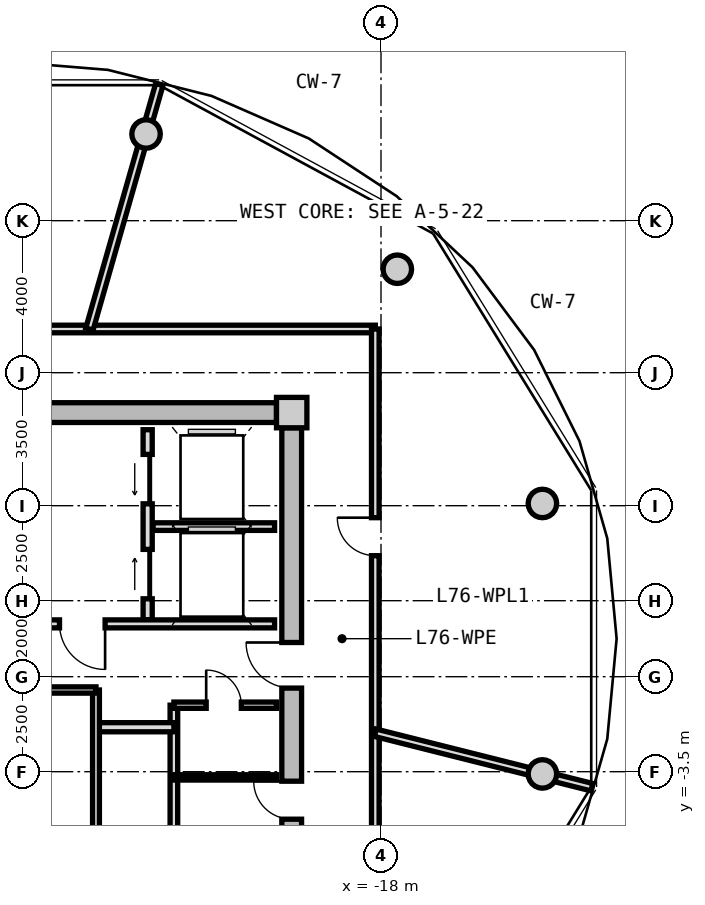
"""IFC4 building model, lengths in metres.
Left out: names, types, materials, properties, quantities, classifications, styles, units other than length and angle.
Written with IfcOpenShell. Run it as: python <this file> out.ifc"""

import sys

from ifc_helpers import new_model, si_unit, direction, frame, frame_2d, origin, origin_2d, place, context, subcontext, project, spatial, rectangle, circle, extrude, source, transform, mapped, element, fill, save


model = new_model("IFC4")
c1 = context("Model", 3, precision=1e-05, world=origin(), true_north=direction((0.0, 1.0)))
c2 = subcontext(c1, "Body", "Model", "MODEL_VIEW")
j1 = project(units=[si_unit("LENGTHUNIT", "METRE"), si_unit("PLANEANGLEUNIT", "RADIAN")], contexts=[c1])
p1 = place(None, origin())
s1 = spatial("IfcSite", under=j1, at=p1, CompositionType="ELEMENT")
p2 = place(p1, origin())
s2 = spatial("IfcBuilding", under=s1, at=p2, CompositionType="ELEMENT")
p3 = place(p2, frame((0.0, 0.0, 244.4)))
s3 = spatial("IfcBuildingStorey", under=s2, at=p3, CompositionType="ELEMENT", Elevation=244.4)
m1 = source(origin(), c2, "Body", "SweptSolid", [
    extrude(rectangle(XDim=0.8, YDim=0.8, at=origin_2d()), origin(), (0.0, 0.0, 1.0), 5.45),
])
p4 = place(p3, frame((-20.35, 5.95, 0.0), z_axis=(0.0, 0.0, 1.0), x_axis=(1.0, 0.0, 0.0)))
e1 = element("IfcColumn", 1, at=p4, inside=s3, PredefinedType="COLUMN", context=c2, shape_type="MappedRepresentation", body=[
    mapped(m1, transform((0.0, 0.0, 0.0), x_axis=(1.0, 0.0, 0.0), y_axis=(0.0, 1.0, 0.0), z_axis=(0.0, 0.0, 1.0), scale=1.0)),
])
m2 = source(origin(), c2, "Body", "SweptSolid", [
    extrude(rectangle(XDim=14.5, YDim=0.52, at=frame_2d((7.25, 0.0))), origin(), (0.0, 0.0, 1.0), 5.175),
])
p5 = place(p3, frame((-35.25, 5.95, 0.0), z_axis=(0.0, 0.0, 1.0), x_axis=(1.0, 0.0, 0.0)))
e2 = element("IfcWall", 2, at=p5, inside=s3, PredefinedType="SHEAR", context=c2, shape_type="MappedRepresentation", body=[
    mapped(m2, transform((0.0, 0.0, 0.0), x_axis=(1.0, 0.0, 0.0), y_axis=(0.0, 1.0, 0.0), z_axis=(0.0, 0.0, 1.0), scale=1.0)),
])
m3 = source(origin(), c2, "Body", "SweptSolid", [
    extrude(rectangle(XDim=11.1, YDim=0.52, at=frame_2d((5.55, 0.0))), origin(), (0.0, 0.0, 1.0), 5.175),
])
p6 = place(p3, frame((-20.35, 5.55, 0.0), z_axis=(0.0, 0.0, 1.0), x_axis=(0.0, -1.0, 0.0)))
e3 = element("IfcWall", 3, at=p6, inside=s3, PredefinedType="SHEAR", context=c2, shape_type="MappedRepresentation", body=[
    mapped(m3, transform((0.0, 0.0, 0.0), x_axis=(1.0, 0.0, 0.0), y_axis=(0.0, 1.0, 0.0), z_axis=(0.0, 0.0, 1.0), scale=1.0)),
])
p7 = place(p6, frame((5.65, 0.0, 0.0)))
e4 = element("IfcOpeningElement", 4, at=p7, cuts=e3, PredefinedType="OPENING", context=c2, shape_type="SweptSolid", body=[
    extrude(rectangle(XDim=1.2, YDim=2.15, at=frame_2d((0.6, 1.075))), frame((0.0, 0.27, 0.0), z_axis=(0.0, -1.0, 0.0), x_axis=(1.0, 0.0, 0.0)), (0.0, 0.0, 1.0), 0.54),
])
p8 = place(p6, frame((9.3, 0.0, 0.0)))
e5 = element("IfcOpeningElement", 5, at=p8, cuts=e3, PredefinedType="OPENING", context=c2, shape_type="SweptSolid", body=[
    extrude(rectangle(XDim=1.0, YDim=2.1, at=frame_2d((0.5, 1.05))), frame((0.0, 0.27, 0.0), z_axis=(0.0, -1.0, 0.0), x_axis=(1.0, 0.0, 0.0)), (0.0, 0.0, 1.0), 0.54),
])
m4 = source(origin(), c2, "Body", "SweptSolid", [
    extrude(circle(Radius=0.375, at=origin_2d()), origin(), (0.0, 0.0, 1.0), 5.45),
])
for number, where, z_axis, x_axis in (
    (6, (-13.753, 3.559, 0.0), (0.0, 0.0, 1.0), (1.0, 0.0, 0.0)),
    (7, (-17.57, 9.723, 0.0), (0.0, 0.0, 1.0), (1.0, 0.0, 0.0)),
    (8, (-24.182, 13.281, 0.0), (0.0, 0.0, 1.0), (1.0, 0.0, 0.0)),
    (9, (-13.753, -3.559, 0.0), (0.0, 0.0, 1.0), (1.0, 0.0, 0.0)),
):
    element("IfcColumn", number, at=place(p3, frame(where, z_axis=z_axis, x_axis=x_axis)), inside=s3, PredefinedType="COLUMN", context=c2, shape_type="MappedRepresentation", body=[
        mapped(m4, transform((0.0, 0.0, 0.0), x_axis=(1.0, 0.0, 0.0), y_axis=(0.0, 1.0, 0.0), z_axis=(0.0, 0.0, 1.0), scale=1.0)),
    ])
m5 = source(origin(), c2, "Body", "SweptSolid", [
    extrude(rectangle(XDim=5.0, YDim=0.24, at=frame_2d((2.5, 0.0))), origin(), (0.0, 0.0, 1.0), 5.16),
])
p9 = place(p3, frame((-24.14, 0.5, 0.0), z_axis=(0.0, 0.0, 1.0), x_axis=(0.0, 1.0, 0.0)))
e10 = element("IfcWall", 10, at=p9, inside=s3, PredefinedType="PARTITIONING", context=c2, shape_type="MappedRepresentation", body=[
    mapped(m5, transform((0.0, 0.0, 0.0), x_axis=(1.0, 0.0, 0.0), y_axis=(0.0, 1.0, 0.0), z_axis=(0.0, 0.0, 1.0), scale=1.0)),
])
p10 = place(p9, frame((3.05, 0.0, 0.0)))
e11 = element("IfcOpeningElement", 11, at=p10, cuts=e10, PredefinedType="OPENING", context=c2, shape_type="SweptSolid", body=[
    extrude(rectangle(XDim=1.3, YDim=2.2, at=frame_2d((0.65, 1.1))), frame((0.0, 0.13, 0.0), z_axis=(0.0, -1.0, 0.0), x_axis=(1.0, 0.0, 0.0)), (0.0, 0.0, 1.0), 0.26),
])
p11 = place(p9, frame((0.55, 0.0, 0.0)))
e12 = element("IfcOpeningElement", 12, at=p11, cuts=e10, PredefinedType="OPENING", context=c2, shape_type="SweptSolid", body=[
    extrude(rectangle(XDim=1.3, YDim=2.2, at=frame_2d((0.65, 1.1))), frame((0.0, 0.13, 0.0), z_axis=(0.0, -1.0, 0.0), x_axis=(1.0, 0.0, 0.0)), (0.0, 0.0, 1.0), 0.26),
])
m6 = source(origin(), c2, "Body", "SweptSolid", [
    extrude(rectangle(XDim=3.2, YDim=0.2, at=frame_2d((1.6, 0.0))), origin(), (0.0, 0.0, 1.0), 5.16),
])
p12 = place(p3, frame((-24.0, 2.95, 0.0), z_axis=(0.0, 0.0, 1.0), x_axis=(1.0, 0.0, 0.0)))
e13 = element("IfcWall", 13, at=p12, inside=s3, PredefinedType="PARTITIONING", context=c2, shape_type="MappedRepresentation", body=[
    mapped(m6, transform((0.0, 0.0, 0.0), x_axis=(1.0, 0.0, 0.0), y_axis=(0.0, 1.0, 0.0), z_axis=(0.0, 0.0, 1.0), scale=1.0)),
])
m7 = source(origin(), c2, "Body", "SweptSolid", [
    extrude(rectangle(XDim=6.66, YDim=0.21, at=frame_2d((3.33, 0.0))), origin(), (0.0, 0.0, 1.0), 5.16),
])
p13 = place(p3, frame((-27.46, 0.39, 0.0), z_axis=(0.0, 0.0, 1.0), x_axis=(1.0, 0.0, 0.0)))
e14 = element("IfcWall", 14, at=p13, inside=s3, PredefinedType="PARTITIONING", context=c2, shape_type="MappedRepresentation", body=[
    mapped(m7, transform((0.0, 0.0, 0.0), x_axis=(1.0, 0.0, 0.0), y_axis=(0.0, 1.0, 0.0), z_axis=(0.0, 0.0, 1.0), scale=1.0)),
])
p14 = place(p13, frame((1.0, 0.0, 0.0)))
e15 = element("IfcOpeningElement", 15, at=p14, cuts=e14, PredefinedType="OPENING", context=c2, shape_type="SweptSolid", body=[
    extrude(rectangle(XDim=1.2, YDim=2.15, at=frame_2d((0.6, 1.075))), frame((0.0, 0.115, 0.0), z_axis=(0.0, -1.0, 0.0), x_axis=(1.0, 0.0, 0.0)), (0.0, 0.0, 1.0), 0.23),
])
m8 = source(origin(), c2, "Body", "SweptSolid", [
    extrude(rectangle(XDim=3.8, YDim=0.2, at=frame_2d((1.9, 0.0))), origin(), (0.0, 0.0, 1.0), 5.16),
])
p15 = place(p3, frame((-23.45, -5.55, 0.0), z_axis=(0.0, 0.0, 1.0), x_axis=(0.0, 1.0, 0.0)))
e16 = element("IfcWall", 16, at=p15, inside=s3, PredefinedType="PARTITIONING", context=c2, shape_type="MappedRepresentation", body=[
    mapped(m8, transform((0.0, 0.0, 0.0), x_axis=(1.0, 0.0, 0.0), y_axis=(0.0, 1.0, 0.0), z_axis=(0.0, 0.0, 1.0), scale=1.0)),
])
m9 = source(origin(), c2, "Body", "SweptSolid", [
    extrude(rectangle(XDim=2.05, YDim=0.24, at=frame_2d((1.025, 0.0))), origin(), (0.0, 0.0, 1.0), 5.16),
])
p16 = place(p3, frame((-25.5, -2.33, 0.0), z_axis=(0.0, 0.0, 1.0), x_axis=(1.0, 0.0, 0.0)))
e17 = element("IfcWall", 17, at=p16, inside=s3, PredefinedType="PARTITIONING", context=c2, shape_type="MappedRepresentation", body=[
    mapped(m9, transform((0.0, 0.0, 0.0), x_axis=(1.0, 0.0, 0.0), y_axis=(0.0, 1.0, 0.0), z_axis=(0.0, 0.0, 1.0), scale=1.0)),
])
m10 = source(origin(), c2, "Body", "SweptSolid", [
    extrude(rectangle(XDim=4.2, YDim=0.18, at=frame_2d((2.1, 0.0))), origin(), (0.0, 0.0, 1.0), 5.16),
])
p17 = place(p3, frame((-25.5, -5.55, 0.0), z_axis=(0.0, 0.0, 1.0), x_axis=(0.0, 1.0, 0.0)))
e18 = element("IfcWall", 18, at=p17, inside=s3, PredefinedType="PARTITIONING", context=c2, shape_type="MappedRepresentation", body=[
    mapped(m10, transform((0.0, 0.0, 0.0), x_axis=(1.0, 0.0, 0.0), y_axis=(0.0, 1.0, 0.0), z_axis=(0.0, 0.0, 1.0), scale=1.0)),
])
m11 = source(origin(), c2, "Body", "SweptSolid", [
    extrude(rectangle(XDim=4.77, YDim=0.165, at=frame_2d((2.385, 0.0))), origin(), (0.0, 0.0, 1.0), 5.16),
])
p18 = place(p3, frame((-30.27, -1.35, 0.0), z_axis=(0.0, 0.0, 1.0), x_axis=(1.0, 0.0, 0.0)))
e19 = element("IfcWall", 19, at=p18, inside=s3, PredefinedType="PARTITIONING", context=c2, shape_type="MappedRepresentation", body=[
    mapped(m11, transform((0.0, 0.0, 0.0), x_axis=(1.0, 0.0, 0.0), y_axis=(0.0, 1.0, 0.0), z_axis=(0.0, 0.0, 1.0), scale=1.0)),
])
p19 = place(p18, frame((1.85, 0.0, 0.0)))
e20 = element("IfcOpeningElement", 20, at=p19, cuts=e19, PredefinedType="OPENING", context=c2, shape_type="SweptSolid", body=[
    extrude(rectangle(XDim=1.0, YDim=2.1, at=frame_2d((0.5, 1.05))), frame((0.0, 0.093, 0.0), z_axis=(0.0, -1.0, 0.0), x_axis=(1.0, 0.0, 0.0)), (0.0, 0.0, 1.0), 0.185),
])
m12 = source(origin(), c2, "Body", "SweptSolid", [
    extrude(rectangle(XDim=2.7, YDim=0.165, at=frame_2d((1.35, 0.0))), origin(), (0.0, 0.0, 1.0), 5.16),
])
p20 = place(p3, frame((-23.45, -1.75, 0.0), z_axis=(0.0, 0.0, 1.0), x_axis=(1.0, 0.0, 0.0)))
e21 = element("IfcWall", 21, at=p20, inside=s3, PredefinedType="PARTITIONING", context=c2, shape_type="MappedRepresentation", body=[
    mapped(m12, transform((0.0, 0.0, 0.0), x_axis=(1.0, 0.0, 0.0), y_axis=(0.0, 1.0, 0.0), z_axis=(0.0, 0.0, 1.0), scale=1.0)),
])
p21 = place(p20, frame((0.85, 0.0, 0.0)))
e22 = element("IfcOpeningElement", 22, at=p21, cuts=e21, PredefinedType="OPENING", context=c2, shape_type="SweptSolid", body=[
    extrude(rectangle(XDim=0.925, YDim=2.1, at=frame_2d((0.462, 1.05))), frame((0.0, 0.093, 0.0), z_axis=(0.0, -1.0, 0.0), x_axis=(1.0, 0.0, 0.0)), (0.0, 0.0, 1.0), 0.185),
])
m13 = source(origin(), c2, "Body", "SweptSolid", [
    extrude(rectangle(XDim=2.7, YDim=0.14, at=frame_2d((1.35, 0.0))), origin(), (0.0, 0.0, 1.0), 5.16),
])
p22 = place(p3, frame((-23.45, -3.65, 0.0), z_axis=(0.0, 0.0, 1.0), x_axis=(1.0, 0.0, 0.0)))
e23 = element("IfcWall", 23, at=p22, inside=s3, PredefinedType="PARTITIONING", context=c2, shape_type="MappedRepresentation", body=[
    mapped(m13, transform((0.0, 0.0, 0.0), x_axis=(1.0, 0.0, 0.0), y_axis=(0.0, 1.0, 0.0), z_axis=(0.0, 0.0, 1.0), scale=1.0)),
])
m14 = source(origin(), c2, "Body", "SweptSolid", [
    extrude(rectangle(XDim=19.7, YDim=0.2, at=frame_2d((9.85, 0.0))), origin(), (0.0, 0.0, 1.0), 5.16),
])
p23 = place(p3, frame((-37.85, 8.15, 0.0), z_axis=(0.0, 0.0, 1.0), x_axis=(1.0, 0.0, 0.0)))
e24 = element("IfcWall", 24, at=p23, inside=s3, PredefinedType="PARTITIONING", context=c2, shape_type="MappedRepresentation", body=[
    mapped(m14, transform((0.0, 0.0, 0.0), x_axis=(1.0, 0.0, 0.0), y_axis=(0.0, 1.0, 0.0), z_axis=(0.0, 0.0, 1.0), scale=1.0)),
])
p24 = place(p23, frame((5.725, 0.0, 0.0)))
e25 = element("IfcOpeningElement", 25, at=p24, cuts=e24, PredefinedType="OPENING", context=c2, shape_type="SweptSolid", body=[
    extrude(rectangle(XDim=1.0, YDim=2.1, at=frame_2d((0.5, 1.05))), frame((0.0, 0.11, 0.0), z_axis=(0.0, -1.0, 0.0), x_axis=(1.0, 0.0, 0.0)), (0.0, 0.0, 1.0), 0.22),
])
m15 = source(origin(), c2, "Body", "SweptSolid", [
    extrude(rectangle(XDim=16.3, YDim=0.2, at=frame_2d((8.15, 0.0))), origin(), (0.0, 0.0, 1.0), 5.16),
])
p25 = place(p3, frame((-18.15, 8.15, 0.0), z_axis=(0.0, 0.0, 1.0), x_axis=(0.0, -1.0, 0.0)))
e26 = element("IfcWall", 26, at=p25, inside=s3, PredefinedType="PARTITIONING", context=c2, shape_type="MappedRepresentation", body=[
    mapped(m15, transform((0.0, 0.0, 0.0), x_axis=(1.0, 0.0, 0.0), y_axis=(0.0, 1.0, 0.0), z_axis=(0.0, 0.0, 1.0), scale=1.0)),
])
p26 = place(p25, frame((4.966, 0.0, 0.0)))
e27 = element("IfcOpeningElement", 27, at=p26, cuts=e26, PredefinedType="OPENING", context=c2, shape_type="SweptSolid", body=[
    extrude(rectangle(XDim=1.0, YDim=2.1, at=frame_2d((0.5, 1.05))), frame((0.0, 0.11, 0.0), z_axis=(0.0, -1.0, 0.0), x_axis=(1.0, 0.0, 0.0)), (0.0, 0.0, 1.0), 0.22),
])
m16 = source(origin(), c2, "Body", "SweptSolid", [
    extrude(rectangle(XDim=5.879, YDim=0.2, at=frame_2d((2.939, 0.0))), origin(), (0.0, 0.0, 1.0), 4.76),
])
p27 = place(p3, frame((-18.15, -2.475, 0.0), z_axis=(0.0, 0.0, 1.0), x_axis=(0.96984127658, -0.24373735504, 0.0)))
e28 = element("IfcWall", 28, at=p27, inside=s3, PredefinedType="PARTITIONING", context=c2, shape_type="MappedRepresentation", body=[
    mapped(m16, transform((0.0, 0.0, 0.0), x_axis=(1.0, 0.0, 0.0), y_axis=(0.0, 1.0, 0.0), z_axis=(0.0, 0.0, 1.0), scale=1.0)),
])
m17 = source(origin(), c2, "Body", "SweptSolid", [
    extrude(rectangle(XDim=6.693, YDim=0.2, at=frame_2d((3.347, 0.0))), origin(), (0.0, 0.0, 1.0), 4.76),
])
p28 = place(p3, frame((-25.672, 8.15, 0.0), z_axis=(0.0, 0.0, 1.0), x_axis=(0.2747066748, 0.96152807698, 0.0)))
e29 = element("IfcWall", 29, at=p28, inside=s3, PredefinedType="PARTITIONING", context=c2, shape_type="MappedRepresentation", body=[
    mapped(m17, transform((0.0, 0.0, 0.0), x_axis=(1.0, 0.0, 0.0), y_axis=(0.0, 1.0, 0.0), z_axis=(0.0, 0.0, 1.0), scale=1.0)),
])
m18 = source(origin(), c2, "Body", "SweptSolid", [
    extrude(rectangle(XDim=1.3, YDim=2.2, at=frame_2d((0.65, 1.1))), frame((0.0, 0.025, 0.0), z_axis=(0.0, -1.0, 0.0), x_axis=(1.0, 0.0, 0.0)), (0.0, 0.0, 1.0), 0.05),
])
p29 = place(p10, origin())
e30 = element("IfcDoor", 30, at=p29, inside=s3, OperationType="SLIDING_TO_LEFT", PredefinedType="DOOR", context=c2, shape_type="MappedRepresentation", body=[
    mapped(m18, transform((0.0, 0.0, 0.0), x_axis=(1.0, 0.0, 0.0), y_axis=(0.0, 1.0, 0.0), z_axis=(0.0, 0.0, 1.0), scale=1.0)),
])
fill(e11, e30)
p30 = place(p11, origin())
e31 = element("IfcDoor", 31, at=p30, inside=s3, OperationType="SLIDING_TO_RIGHT", PredefinedType="DOOR", context=c2, shape_type="MappedRepresentation", body=[
    mapped(m18, transform((0.0, 0.0, 0.0), x_axis=(1.0, 0.0, 0.0), y_axis=(0.0, 1.0, 0.0), z_axis=(0.0, 0.0, 1.0), scale=1.0)),
])
fill(e12, e31)
m19 = source(origin(), c2, "Body", "SweptSolid", [
    extrude(rectangle(XDim=1.2, YDim=2.15, at=frame_2d((0.6, 1.075))), frame((0.0, 0.025, 0.0), z_axis=(0.0, -1.0, 0.0), x_axis=(1.0, 0.0, 0.0)), (0.0, 0.0, 1.0), 0.05),
])
p31 = place(p14, frame((1.2, 0.0, 0.0), z_axis=(0.0, 0.0, 1.0), x_axis=(-1.0, 0.0, 0.0)))
e32 = element("IfcDoor", 32, at=p31, inside=s3, OperationType="SINGLE_SWING_LEFT", PredefinedType="DOOR", context=c2, shape_type="MappedRepresentation", body=[
    mapped(m19, transform((0.0, 0.0, 0.0), x_axis=(1.0, 0.0, 0.0), y_axis=(0.0, 1.0, 0.0), z_axis=(0.0, 0.0, 1.0), scale=1.0)),
])
fill(e15, e32)
p32 = place(p7, frame((1.2, 0.0, 0.0), z_axis=(0.0, 0.0, 1.0), x_axis=(-1.0, 0.0, 0.0)))
e33 = element("IfcDoor", 33, at=p32, inside=s3, OperationType="SINGLE_SWING_RIGHT", PredefinedType="DOOR", context=c2, shape_type="MappedRepresentation", body=[
    mapped(m19, transform((0.0, 0.0, 0.0), x_axis=(1.0, 0.0, 0.0), y_axis=(0.0, 1.0, 0.0), z_axis=(0.0, 0.0, 1.0), scale=1.0)),
])
fill(e4, e33)
m20 = source(origin(), c2, "Body", "SweptSolid", [
    extrude(rectangle(XDim=0.925, YDim=2.1, at=frame_2d((0.462, 1.05))), frame((0.0, 0.025, 0.0), z_axis=(0.0, -1.0, 0.0), x_axis=(1.0, 0.0, 0.0)), (0.0, 0.0, 1.0), 0.05),
])
p33 = place(p21, origin())
e34 = element("IfcDoor", 34, at=p33, inside=s3, OperationType="SINGLE_SWING_LEFT", PredefinedType="DOOR", context=c2, shape_type="MappedRepresentation", body=[
    mapped(m20, transform((0.0, 0.0, 0.0), x_axis=(1.0, 0.0, 0.0), y_axis=(0.0, 1.0, 0.0), z_axis=(0.0, 0.0, 1.0), scale=1.0)),
])
fill(e22, e34)
m21 = source(origin(), c2, "Body", "SweptSolid", [
    extrude(rectangle(XDim=1.0, YDim=2.1, at=frame_2d((0.5, 1.05))), frame((0.0, 0.025, 0.0), z_axis=(0.0, -1.0, 0.0), x_axis=(1.0, 0.0, 0.0)), (0.0, 0.0, 1.0), 0.05),
])
p34 = place(p8, frame((1.0, 0.0, 0.0), z_axis=(0.0, 0.0, 1.0), x_axis=(-1.0, 0.0, 0.0)))
e35 = element("IfcDoor", 35, at=p34, inside=s3, OperationType="SINGLE_SWING_RIGHT", PredefinedType="DOOR", context=c2, shape_type="MappedRepresentation", body=[
    mapped(m21, transform((0.0, 0.0, 0.0), x_axis=(1.0, 0.0, 0.0), y_axis=(0.0, 1.0, 0.0), z_axis=(0.0, 0.0, 1.0), scale=1.0)),
])
fill(e5, e35)
p35 = place(p26, frame((1.0, 0.0, 0.0), z_axis=(0.0, 0.0, 1.0), x_axis=(-1.0, 0.0, 0.0)))
e36 = element("IfcDoor", 36, at=p35, inside=s3, OperationType="SINGLE_SWING_RIGHT", PredefinedType="DOOR", context=c2, shape_type="MappedRepresentation", body=[
    mapped(m21, transform((0.0, 0.0, 0.0), x_axis=(1.0, 0.0, 0.0), y_axis=(0.0, 1.0, 0.0), z_axis=(0.0, 0.0, 1.0), scale=1.0)),
])
fill(e27, e36)
save(model, sys.argv[1])
